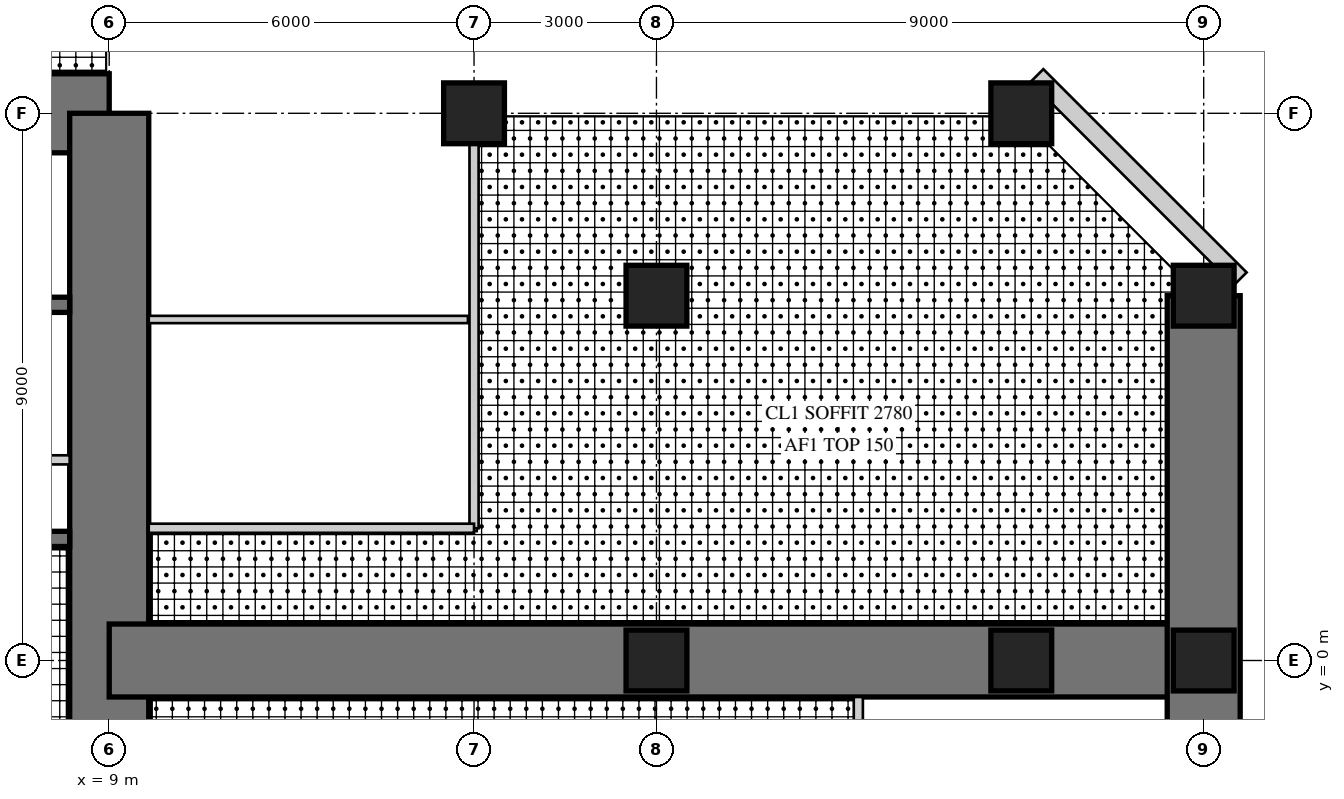
"""IFC4 building model, lengths in metres.
Left out: names, types, materials, properties, quantities, classifications, styles, units other than length and angle.
Written with IfcOpenShell. Run it as: python <this file> out.ifc"""

import sys

from ifc_helpers import new_model, si_unit, direction, frame, frame_2d, origin, origin_2d, place, context, subcontext, project, spatial, rectangle, hollow_rectangle, extrude, element, fill, save


model = new_model("IFC4")
c1 = context("Model", 3, precision=1e-05, world=origin(), true_north=direction((0.0, 1.0)))
c2 = subcontext(c1, "Body", "Model", "MODEL_VIEW")
j1 = project(units=[si_unit("LENGTHUNIT", "METRE"), si_unit("PLANEANGLEUNIT", "RADIAN")], contexts=[c1])
p1 = place(None, origin())
s1 = spatial("IfcSite", under=j1, at=p1, CompositionType="ELEMENT")
p2 = place(p1, origin())
s2 = spatial("IfcBuilding", under=s1, at=p2, CompositionType="ELEMENT")
p3 = place(p2, frame((0.0, 0.0, 116.5)))
s3 = spatial("IfcBuildingStorey", under=s2, at=p3, CompositionType="ELEMENT", Elevation=116.5)
p4 = place(p3, frame((9.0, 9.0, 0.0), z_axis=(0.0, 0.0, 1.0), x_axis=(-1.0, 0.0, 0.0)))
e1 = element("IfcWall", 1, at=p4, inside=s3, PredefinedType="SHEAR", context=c2, shape_type="SweptSolid", body=[
    extrude(rectangle(XDim=18.0, YDim=1.3, at=frame_2d((9.0, 0.0))), origin(), (0.0, 0.0, 1.0), 4.0),
])
p5 = place(p4, frame((9.8, 0.0, 0.0)))
e2 = element("IfcOpeningElement", 2, at=p5, cuts=e1, PredefinedType="OPENING", context=c2, shape_type="SweptSolid", body=[
    extrude(rectangle(XDim=1.0, YDim=2.4, at=frame_2d((0.5, 1.2))), frame((0.0, 0.66, 0.0), z_axis=(0.0, -1.0, 0.0), x_axis=(1.0, 0.0, 0.0)), (0.0, 0.0, 1.0), 1.32),
])
p6 = place(p3, frame((9.0, -9.0, 0.0), z_axis=(0.0, 0.0, 1.0), x_axis=(0.0, 1.0, 0.0)))
e3 = element("IfcWall", 3, at=p6, inside=s3, PredefinedType="SHEAR", context=c2, shape_type="SweptSolid", body=[
    extrude(rectangle(XDim=18.0, YDim=1.3, at=frame_2d((9.0, 0.0))), origin(), (0.0, 0.0, 1.0), 4.0),
])
p7 = place(p6, frame((9.8, 0.0, 0.0)))
e4 = element("IfcOpeningElement", 4, at=p7, cuts=e3, PredefinedType="OPENING", context=c2, shape_type="SweptSolid", body=[
    extrude(rectangle(XDim=1.0, YDim=2.4, at=frame_2d((0.5, 1.2))), frame((0.0, 0.66, 0.0), z_axis=(0.0, -1.0, 0.0), x_axis=(1.0, 0.0, 0.0)), (0.0, 0.0, 1.0), 1.32),
])
p8 = place(p3, frame((1.925, 2.0, 0.0), z_axis=(0.0, 0.0, 1.0), x_axis=(1.0, 0.0, 0.0)))
e5 = element("IfcWall", 5, at=p8, inside=s3, PredefinedType="SHEAR", context=c2, shape_type="SweptSolid", body=[
    extrude(rectangle(XDim=6.425, YDim=0.25, at=frame_2d((3.212, 0.0))), origin(), (0.0, 0.0, 1.0), 4.0),
])
p9 = place(p3, frame((1.925, 5.85, 0.0), z_axis=(0.0, 0.0, 1.0), x_axis=(1.0, 0.0, 0.0)))
e6 = element("IfcWall", 6, at=p9, inside=s3, PredefinedType="SHEAR", context=c2, shape_type="SweptSolid", body=[
    extrude(rectangle(XDim=6.425, YDim=0.25, at=frame_2d((3.212, 0.0))), origin(), (0.0, 0.0, 1.0), 4.0),
])
p10 = place(p9, frame((0.454, 0.0, 0.0)))
e7 = element("IfcOpeningElement", 7, at=p10, cuts=e6, PredefinedType="OPENING", context=c2, shape_type="SweptSolid", body=[
    extrude(rectangle(XDim=1.1, YDim=2.2, at=frame_2d((0.55, 1.1))), frame((0.0, 0.135, 0.0), z_axis=(0.0, -1.0, 0.0), x_axis=(1.0, 0.0, 0.0)), (0.0, 0.0, 1.0), 0.27),
])
p11 = place(p9, frame((2.663, 0.0, 0.0)))
e8 = element("IfcOpeningElement", 8, at=p11, cuts=e6, PredefinedType="OPENING", context=c2, shape_type="SweptSolid", body=[
    extrude(rectangle(XDim=1.1, YDim=2.2, at=frame_2d((0.55, 1.1))), frame((0.0, 0.135, 0.0), z_axis=(0.0, -1.0, 0.0), x_axis=(1.0, 0.0, 0.0)), (0.0, 0.0, 1.0), 0.27),
])
p12 = place(p9, frame((4.871, 0.0, 0.0)))
e9 = element("IfcOpeningElement", 9, at=p12, cuts=e6, PredefinedType="OPENING", context=c2, shape_type="SweptSolid", body=[
    extrude(rectangle(XDim=1.1, YDim=2.2, at=frame_2d((0.55, 1.1))), frame((0.0, 0.135, 0.0), z_axis=(0.0, -1.0, 0.0), x_axis=(1.0, 0.0, 0.0)), (0.0, 0.0, 1.0), 0.27),
])
p13 = place(p3, frame((1.925, 3.3, 0.0), z_axis=(0.0, 0.0, 1.0), x_axis=(1.0, 0.0, 0.0)))
e10 = element("IfcWall", 10, at=p13, inside=s3, PredefinedType="PARTITIONING", context=c2, shape_type="SweptSolid", body=[
    extrude(rectangle(XDim=6.425, YDim=0.15, at=frame_2d((3.212, 0.0))), origin(), (0.0, 0.0, 1.0), 4.0),
])
p14 = place(p13, frame((0.075, 0.0, 0.0)))
e11 = element("IfcOpeningElement", 11, at=p14, cuts=e10, PredefinedType="OPENING", context=c2, shape_type="SweptSolid", body=[
    extrude(rectangle(XDim=0.8, YDim=2.1, at=frame_2d((0.4, 1.05))), frame((0.0, 0.085, 0.0), z_axis=(0.0, -1.0, 0.0), x_axis=(1.0, 0.0, 0.0)), (0.0, 0.0, 1.0), 0.17),
])
p15 = place(p13, frame((3.675, 0.0, 0.0)))
e12 = element("IfcOpeningElement", 12, at=p15, cuts=e10, PredefinedType="OPENING", context=c2, shape_type="SweptSolid", body=[
    extrude(rectangle(XDim=0.8, YDim=2.1, at=frame_2d((0.4, 1.05))), frame((0.0, 0.085, 0.0), z_axis=(0.0, -1.0, 0.0), x_axis=(1.0, 0.0, 0.0)), (0.0, 0.0, 1.0), 0.17),
])
p16 = place(p3, frame((9.0, 0.0, 0.0), z_axis=(0.0, 0.0, 1.0), x_axis=(1.0, 0.0, 0.0)))
e13 = element("IfcWall", 13, at=p16, inside=s3, PredefinedType="SHEAR", context=c2, shape_type="SweptSolid", body=[
    extrude(rectangle(XDim=18.0, YDim=1.2, at=frame_2d((9.0, 0.0))), origin(), (0.0, 0.0, 1.0), 4.0),
])
p17 = place(p16, frame((9.8, 0.0, 0.0)))
e14 = element("IfcOpeningElement", 14, at=p17, cuts=e13, PredefinedType="OPENING", context=c2, shape_type="SweptSolid", body=[
    extrude(rectangle(XDim=1.0, YDim=2.2, at=frame_2d((0.5, 1.1))), frame((0.0, 0.61, 0.0), z_axis=(0.0, -1.0, 0.0), x_axis=(1.0, 0.0, 0.0)), (0.0, 0.0, 1.0), 1.22),
])
p18 = place(p3, frame((27.0, -6.0, 0.0), z_axis=(0.0, 0.0, 1.0), x_axis=(0.0, 1.0, 0.0)))
e15 = element("IfcWall", 15, at=p18, inside=s3, PredefinedType="SHEAR", context=c2, shape_type="SweptSolid", body=[
    extrude(rectangle(XDim=12.0, YDim=1.2, at=frame_2d((6.0, 0.0))), origin(), (0.0, 0.0, 1.0), 4.0),
])
p19 = place(p18, frame((1.55, 0.0, 0.6)))
e16 = element("IfcOpeningElement", 16, at=p19, cuts=e15, PredefinedType="OPENING", context=c2, shape_type="SweptSolid", body=[
    extrude(rectangle(XDim=3.0, YDim=2.4, at=frame_2d((1.5, 1.2))), frame((0.0, 0.61, 0.0), z_axis=(0.0, -1.0, 0.0), x_axis=(1.0, 0.0, 0.0)), (0.0, 0.0, 1.0), 1.22),
])
p20 = place(p18, frame((7.45, 0.0, 0.6)))
e17 = element("IfcOpeningElement", 17, at=p20, cuts=e15, PredefinedType="OPENING", context=c2, shape_type="SweptSolid", body=[
    extrude(rectangle(XDim=3.0, YDim=2.4, at=frame_2d((1.5, 1.2))), frame((0.0, 0.61, 0.0), z_axis=(0.0, -1.0, 0.0), x_axis=(1.0, 0.0, 0.0)), (0.0, 0.0, 1.0), 1.22),
])
for number, where, z_axis, x_axis in (
    (18, (15.0, 9.0, 0.0), (0.0, 0.0, 1.0), (1.0, 0.0, 0.0)),
    (19, (24.0, 9.0, 0.0), (0.0, 0.0, 1.0), (1.0, 0.0, 0.0)),
    (20, (27.0, 0.0, 0.0), (0.0, 0.0, 1.0), (1.0, 0.0, 0.0)),
    (21, (27.0, 6.0, 0.0), (0.0, 0.0, 1.0), (1.0, 0.0, 0.0)),
    (22, (18.0, 0.0, 0.0), (0.0, 0.0, 1.0), (1.0, 0.0, 0.0)),
    (23, (18.0, 6.0, 0.0), (0.0, 0.0, 1.0), (1.0, 0.0, 0.0)),
    (24, (24.0, 0.0, 0.0), (0.0, 0.0, 1.0), (1.0, 0.0, 0.0)),
):
    element("IfcColumn", number, at=place(p3, frame(where, z_axis=z_axis, x_axis=x_axis)), inside=s3, PredefinedType="COLUMN", context=c2, shape_type="SweptSolid", body=[
        extrude(rectangle(XDim=1.0, YDim=1.0, at=origin_2d()), origin(), (0.0, 0.0, 1.0), 4.0),
    ])
p21 = place(p3, frame((27.6, 6.277, 0.0), z_axis=(0.0, 0.0, 1.0), x_axis=(-0.707106781187, 0.707106781187, 0.0)))
e25 = element("IfcWall", 25, at=p21, inside=s3, PredefinedType="SOLIDWALL", context=c2, shape_type="SweptSolid", body=[
    extrude(rectangle(XDim=4.728, YDim=0.3, at=frame_2d((2.364, 0.0))), origin(), (0.0, 0.0, 1.0), 3.8),
])
p22 = place(p21, frame((1.914, 0.0, 0.3)))
e26 = element("IfcOpeningElement", 26, at=p22, cuts=e25, PredefinedType="OPENING", context=c2, shape_type="SweptSolid", body=[
    extrude(rectangle(XDim=0.9, YDim=2.4, at=frame_2d((0.45, 1.2))), frame((0.0, 0.16, 0.0), z_axis=(0.0, -1.0, 0.0), x_axis=(1.0, 0.0, 0.0)), (0.0, 0.0, 1.0), 0.32),
])
p23 = place(p3, frame((15.0, 2.175, 0.0), z_axis=(0.0, 0.0, 1.0), x_axis=(0.0, 1.0, 0.0)))
e27 = element("IfcWall", 27, at=p23, inside=s3, PredefinedType="PARTITIONING", context=c2, shape_type="SweptSolid", body=[
    extrude(rectangle(XDim=6.325, YDim=0.15, at=frame_2d((3.163, 0.0))), origin(), (0.0, 0.0, 1.0), 3.0),
])
p24 = place(p23, frame((1.217, 0.0, 0.0)))
e28 = element("IfcOpeningElement", 28, at=p24, cuts=e27, PredefinedType="OPENING", context=c2, shape_type="SweptSolid", body=[
    extrude(rectangle(XDim=1.0, YDim=2.1, at=frame_2d((0.5, 1.05))), frame((0.0, 0.085, 0.0), z_axis=(0.0, -1.0, 0.0), x_axis=(1.0, 0.0, 0.0)), (0.0, 0.0, 1.0), 0.17),
])
p25 = place(p23, frame((4.379, 0.0, 0.0)))
e29 = element("IfcOpeningElement", 29, at=p25, cuts=e27, PredefinedType="OPENING", context=c2, shape_type="SweptSolid", body=[
    extrude(rectangle(XDim=1.0, YDim=2.1, at=frame_2d((0.5, 1.05))), frame((0.0, 0.085, 0.0), z_axis=(0.0, -1.0, 0.0), x_axis=(1.0, 0.0, 0.0)), (0.0, 0.0, 1.0), 0.17),
])
p26 = place(p3, frame((9.65, 2.175, 0.0), z_axis=(0.0, 0.0, 1.0), x_axis=(1.0, 0.0, 0.0)))
e30 = element("IfcWall", 30, at=p26, inside=s3, PredefinedType="PARTITIONING", context=c2, shape_type="SweptSolid", body=[
    extrude(rectangle(XDim=5.35, YDim=0.15, at=frame_2d((2.675, 0.0))), origin(), (0.0, 0.0, 1.0), 3.8),
])
p27 = place(p3, frame((9.65, 5.609, 0.0), z_axis=(0.0, 0.0, 1.0), x_axis=(1.0, 0.0, 0.0)))
e31 = element("IfcWall", 31, at=p27, inside=s3, PredefinedType="PLUMBINGWALL", context=c2, shape_type="SweptSolid", body=[
    extrude(rectangle(XDim=5.25, YDim=0.12, at=frame_2d((2.625, 0.0))), origin(), (0.0, 0.0, 1.0), 3.8),
])
p28 = place(p3, frame((21.32, -9.58, 0.0), z_axis=(0.0, 0.0, 1.0), x_axis=(0.0, 1.0, 0.0)))
e32 = element("IfcWall", 32, at=p28, inside=s3, PredefinedType="PARTITIONING", context=c2, shape_type="SweptSolid", body=[
    extrude(rectangle(XDim=8.98, YDim=0.15, at=frame_2d((4.49, 0.0))), origin(), (0.0, 0.0, 1.0), 3.8),
])
p29 = place(p28, frame((4.987, 0.0, 0.0)))
e33 = element("IfcOpeningElement", 33, at=p29, cuts=e32, PredefinedType="OPENING", context=c2, shape_type="SweptSolid", body=[
    extrude(rectangle(XDim=1.0, YDim=2.2, at=frame_2d((0.5, 1.1))), frame((0.0, 0.085, 0.0), z_axis=(0.0, -1.0, 0.0), x_axis=(1.0, 0.0, 0.0)), (0.0, 0.0, 1.0), 0.17),
])
p30 = place(p28, frame((7.63, 0.0, 0.0)))
e34 = element("IfcOpeningElement", 34, at=p30, cuts=e32, PredefinedType="OPENING", context=c2, shape_type="SweptSolid", body=[
    extrude(rectangle(XDim=1.0, YDim=2.2, at=frame_2d((0.5, 1.1))), frame((0.0, 0.085, 0.0), z_axis=(0.0, -1.0, 0.0), x_axis=(1.0, 0.0, 0.0)), (0.0, 0.0, 1.0), 0.17),
])
p31 = place(p20, origin())
e35 = element("IfcWindow", 35, at=p31, inside=s3, PartitioningType="SINGLE_PANEL", PredefinedType="WINDOW", context=c2, shape_type="SweptSolid", body=[
    extrude(hollow_rectangle(XDim=3.0, YDim=2.4, WallThickness=0.06, at=frame_2d((1.5, 1.2))), frame((0.0, 0.03, 0.0), z_axis=(0.0, -1.0, 0.0), x_axis=(1.0, 0.0, 0.0)), (0.0, 0.0, 1.0), 0.06),
    extrude(rectangle(XDim=2.879, YDim=2.279, at=frame_2d((1.5, 1.2))), frame((0.0, 0.03, 0.0), z_axis=(0.0, -1.0, 0.0), x_axis=(1.0, 0.0, 0.0)), (0.0, 0.0, 1.0), 0.06),
])
fill(e17, e35)
p32 = place(p22, origin())
e36 = element("IfcWindow", 36, at=p32, inside=s3, PartitioningType="SINGLE_PANEL", PredefinedType="WINDOW", context=c2, shape_type="SweptSolid", body=[
    extrude(hollow_rectangle(XDim=0.9, YDim=2.4, WallThickness=0.06, at=frame_2d((0.45, 1.2))), frame((0.0, 0.03, 0.0), z_axis=(0.0, -1.0, 0.0), x_axis=(1.0, 0.0, 0.0)), (0.0, 0.0, 1.0), 0.06),
    extrude(rectangle(XDim=0.779, YDim=2.279, at=frame_2d((0.45, 1.2))), frame((0.0, 0.03, 0.0), z_axis=(0.0, -1.0, 0.0), x_axis=(1.0, 0.0, 0.0)), (0.0, 0.0, 1.0), 0.06),
])
fill(e26, e36)
p33 = place(p24, origin())
e37 = element("IfcDoor", 37, at=p33, inside=s3, OperationType="SINGLE_SWING_LEFT", PredefinedType="DOOR", context=c2, shape_type="SweptSolid", body=[
    extrude(rectangle(XDim=1.0, YDim=2.1, at=frame_2d((0.5, 1.05))), frame((0.0, 0.025, 0.0), z_axis=(0.0, -1.0, 0.0), x_axis=(1.0, 0.0, 0.0)), (0.0, 0.0, 1.0), 0.05),
])
fill(e28, e37)
p34 = place(p25, origin())
e38 = element("IfcDoor", 38, at=p34, inside=s3, OperationType="SINGLE_SWING_LEFT", PredefinedType="DOOR", context=c2, shape_type="SweptSolid", body=[
    extrude(rectangle(XDim=1.0, YDim=2.1, at=frame_2d((0.5, 1.05))), frame((0.0, 0.025, 0.0), z_axis=(0.0, -1.0, 0.0), x_axis=(1.0, 0.0, 0.0)), (0.0, 0.0, 1.0), 0.05),
])
fill(e29, e38)
p35 = place(p30, frame((1.0, 0.0, 0.0), z_axis=(0.0, 0.0, 1.0), x_axis=(-1.0, 0.0, 0.0)))
e39 = element("IfcDoor", 39, at=p35, inside=s3, OperationType="SINGLE_SWING_LEFT", PredefinedType="DOOR", context=c2, shape_type="SweptSolid", body=[
    extrude(rectangle(XDim=1.0, YDim=2.2, at=frame_2d((0.5, 1.1))), frame((0.0, 0.025, 0.0), z_axis=(0.0, -1.0, 0.0), x_axis=(1.0, 0.0, 0.0)), (0.0, 0.0, 1.0), 0.05),
])
fill(e34, e39)
p36 = place(p17, frame((1.0, 0.0, 0.0), z_axis=(0.0, 0.0, 1.0), x_axis=(-1.0, 0.0, 0.0)))
e40 = element("IfcDoor", 40, at=p36, inside=s3, OperationType="SINGLE_SWING_LEFT", PredefinedType="DOOR", context=c2, shape_type="SweptSolid", body=[
    extrude(rectangle(XDim=1.0, YDim=2.2, at=frame_2d((0.5, 1.1))), frame((0.0, 0.025, 0.0), z_axis=(0.0, -1.0, 0.0), x_axis=(1.0, 0.0, 0.0)), (0.0, 0.0, 1.0), 0.05),
])
fill(e14, e40)
p37 = place(p7, frame((1.0, 0.0, 0.0), z_axis=(0.0, 0.0, 1.0), x_axis=(-1.0, 0.0, 0.0)))
e41 = element("IfcDoor", 41, at=p37, inside=s3, OperationType="SINGLE_SWING_RIGHT", PredefinedType="DOOR", context=c2, shape_type="SweptSolid", body=[
    extrude(rectangle(XDim=1.0, YDim=2.4, at=frame_2d((0.5, 1.2))), frame((0.0, -0.005, 0.0), z_axis=(0.0, -1.0, 0.0), x_axis=(1.0, 0.0, 0.0)), (0.0, 0.0, 1.0), 0.05),
])
fill(e4, e41)
save(model, sys.argv[1])
